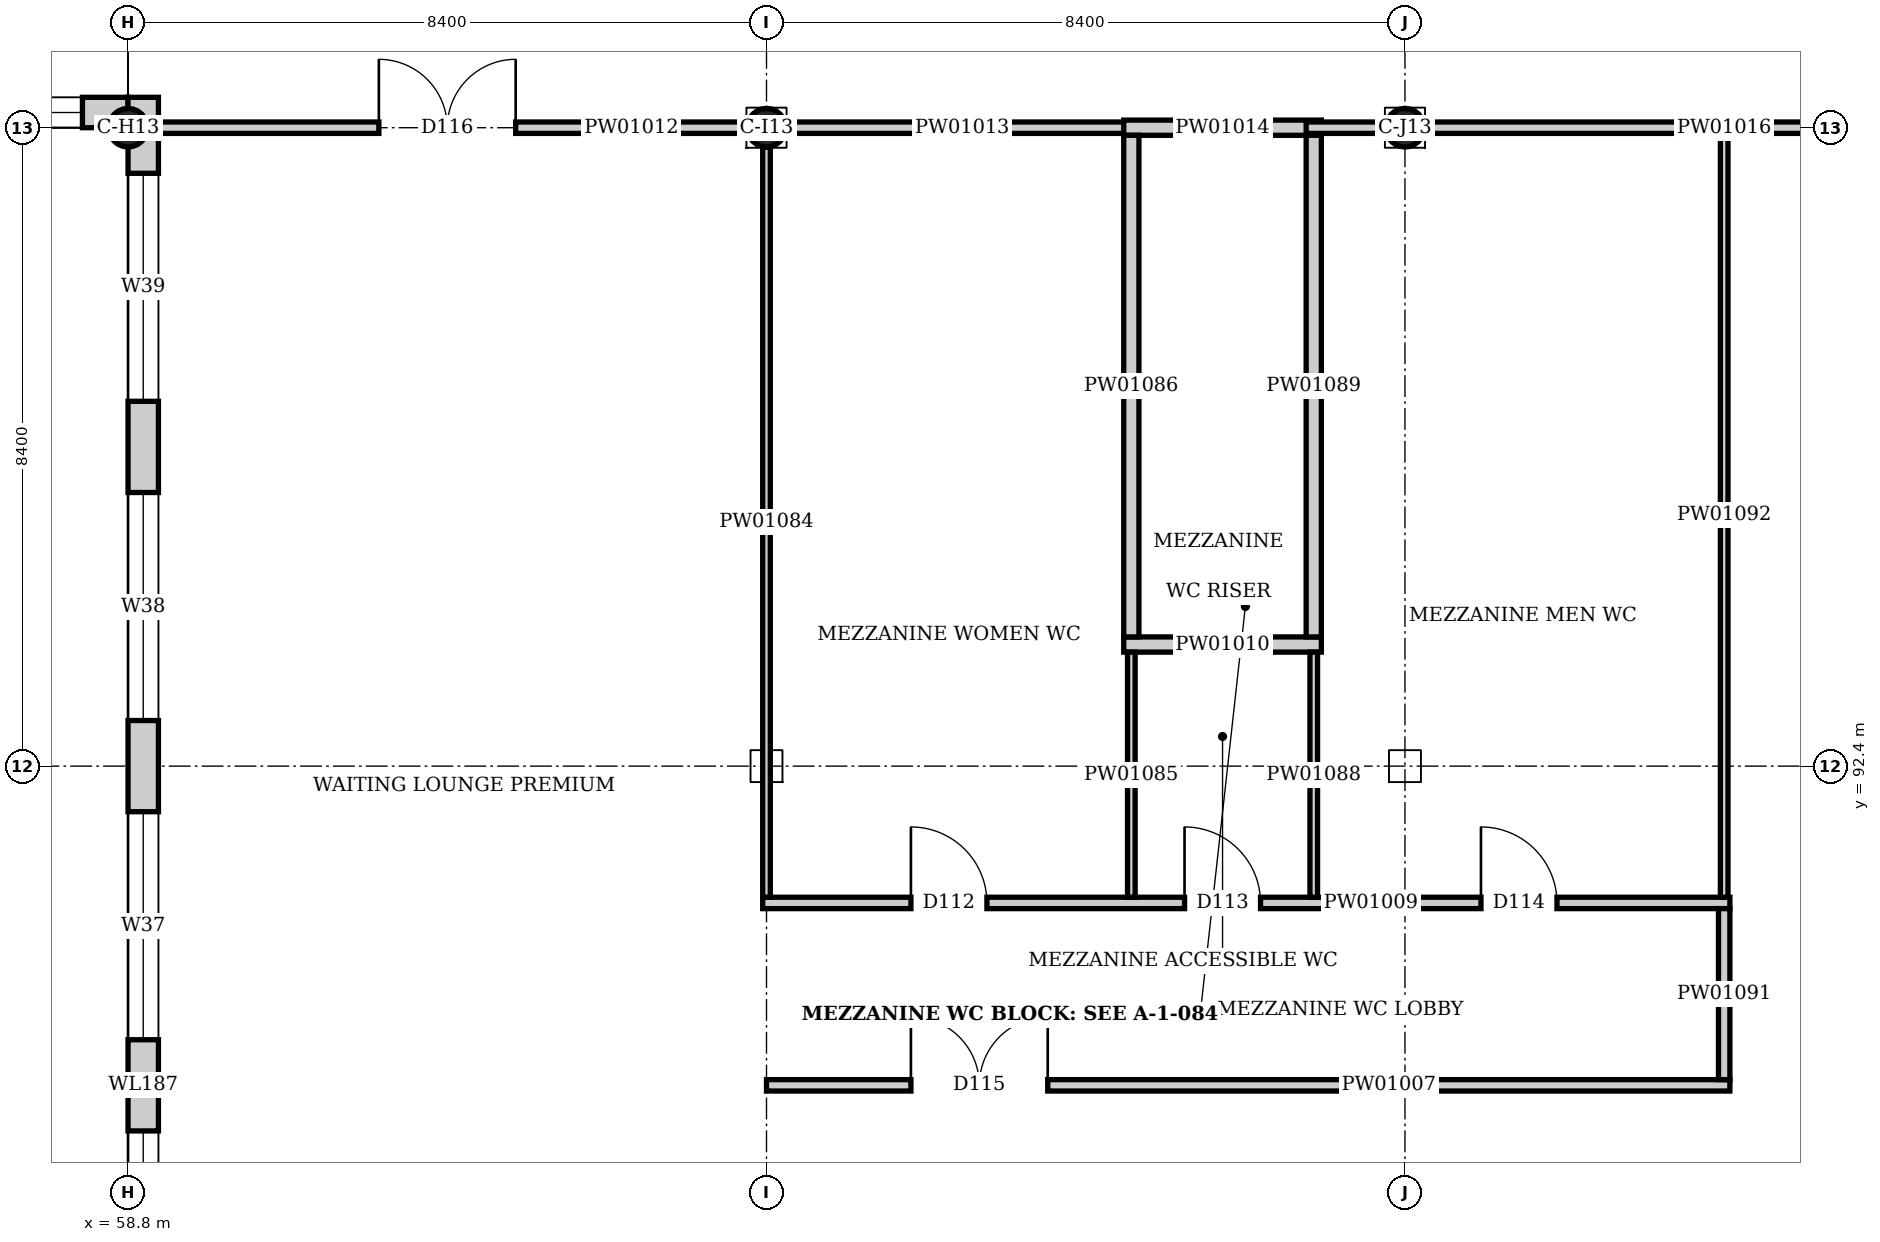
"""IFC4 building model, lengths in metres.
Left out: names, types, materials, properties, quantities, classifications, styles, units other than length and angle.
Written with IfcOpenShell. Run it as: python <this file> out.ifc"""

import sys

from ifc_helpers import new_model, si_unit, direction, frame, frame_2d, origin, origin_2d, place, context, subcontext, project, spatial, rectangle, hollow_circle, extrude, element, fill, save


model = new_model("IFC4")
c1 = context("Model", 3, precision=1e-05, world=origin(), true_north=direction((0.0, 1.0)))
c2 = subcontext(c1, "Body", "Model", "MODEL_VIEW")
j1 = project(units=[si_unit("LENGTHUNIT", "METRE"), si_unit("PLANEANGLEUNIT", "RADIAN")], contexts=[c1])
p1 = place(None, origin())
s1 = spatial("IfcSite", under=j1, at=p1, CompositionType="ELEMENT")
p2 = place(p1, origin())
s2 = spatial("IfcBuilding", under=s1, at=p2, CompositionType="ELEMENT")
p3 = place(p2, frame((0.0, 0.0, 6.0)))
s3 = spatial("IfcBuildingStorey", under=s2, at=p3, CompositionType="ELEMENT", Elevation=6.0)
for number, where, z_axis, x_axis in (
    (1, (58.8, 100.8, 0.0), (0.0, 0.0, 1.0), (1.0, 0.0, 0.0)),
    (2, (67.2, 100.8, 0.0), (0.0, 0.0, 1.0), (1.0, 0.0, 0.0)),
    (3, (75.6, 100.8, 0.0), (0.0, 0.0, 1.0), (1.0, 0.0, 0.0)),
):
    element("IfcColumn", number, at=place(p3, frame(where, z_axis=z_axis, x_axis=x_axis)), inside=s3, PredefinedType="COLUMN", context=c2, shape_type="SweptSolid", body=[
        extrude(hollow_circle(Radius=0.254, WallThickness=0.016, at=origin_2d()), origin(), (0.0, 0.0, 1.0), 4.8),
    ])
p4 = place(p3, frame((25.454, 101.0, 0.0), z_axis=(0.0, 0.0, 1.0), x_axis=(1.0, 0.0, 0.0)))
e4 = element("IfcWall", 4, at=p4, inside=s3, PredefinedType="SOLIDWALL", context=c2, shape_type="SweptSolid", body=[
    extrude(rectangle(XDim=33.346, YDim=0.4, at=frame_2d((16.673, 0.0))), origin(), (0.0, 0.0, 1.0), 4.6),
])
p5 = place(p4, frame((0.346, 0.0, 0.6)))
e5 = element("IfcOpeningElement", 5, at=p5, cuts=e4, PredefinedType="OPENING", context=c2, shape_type="SweptSolid", body=[
    extrude(rectangle(XDim=3.0, YDim=2.7, at=frame_2d((1.5, 1.35))), frame((0.0, 0.21, 0.0), z_axis=(0.0, -1.0, 0.0), x_axis=(1.0, 0.0, 0.0)), (0.0, 0.0, 1.0), 0.42),
])
p6 = place(p4, frame((4.546, 0.0, 0.6)))
e6 = element("IfcOpeningElement", 6, at=p6, cuts=e4, PredefinedType="OPENING", context=c2, shape_type="SweptSolid", body=[
    extrude(rectangle(XDim=3.0, YDim=2.7, at=frame_2d((1.5, 1.35))), frame((0.0, 0.21, 0.0), z_axis=(0.0, -1.0, 0.0), x_axis=(1.0, 0.0, 0.0)), (0.0, 0.0, 1.0), 0.42),
])
p7 = place(p4, frame((8.746, 0.0, 0.6)))
e7 = element("IfcOpeningElement", 7, at=p7, cuts=e4, PredefinedType="OPENING", context=c2, shape_type="SweptSolid", body=[
    extrude(rectangle(XDim=3.0, YDim=2.7, at=frame_2d((1.5, 1.35))), frame((0.0, 0.21, 0.0), z_axis=(0.0, -1.0, 0.0), x_axis=(1.0, 0.0, 0.0)), (0.0, 0.0, 1.0), 0.42),
])
p8 = place(p4, frame((12.946, 0.0, 0.6)))
e8 = element("IfcOpeningElement", 8, at=p8, cuts=e4, PredefinedType="OPENING", context=c2, shape_type="SweptSolid", body=[
    extrude(rectangle(XDim=3.0, YDim=2.7, at=frame_2d((1.5, 1.35))), frame((0.0, 0.21, 0.0), z_axis=(0.0, -1.0, 0.0), x_axis=(1.0, 0.0, 0.0)), (0.0, 0.0, 1.0), 0.42),
])
p9 = place(p4, frame((17.146, 0.0, 0.6)))
e9 = element("IfcOpeningElement", 9, at=p9, cuts=e4, PredefinedType="OPENING", context=c2, shape_type="SweptSolid", body=[
    extrude(rectangle(XDim=3.0, YDim=2.7, at=frame_2d((1.5, 1.35))), frame((0.0, 0.21, 0.0), z_axis=(0.0, -1.0, 0.0), x_axis=(1.0, 0.0, 0.0)), (0.0, 0.0, 1.0), 0.42),
])
p10 = place(p4, frame((21.346, 0.0, 0.6)))
e10 = element("IfcOpeningElement", 10, at=p10, cuts=e4, PredefinedType="OPENING", context=c2, shape_type="SweptSolid", body=[
    extrude(rectangle(XDim=3.0, YDim=2.7, at=frame_2d((1.5, 1.35))), frame((0.0, 0.21, 0.0), z_axis=(0.0, -1.0, 0.0), x_axis=(1.0, 0.0, 0.0)), (0.0, 0.0, 1.0), 0.42),
])
p11 = place(p4, frame((25.546, 0.0, 0.6)))
e11 = element("IfcOpeningElement", 11, at=p11, cuts=e4, PredefinedType="OPENING", context=c2, shape_type="SweptSolid", body=[
    extrude(rectangle(XDim=3.0, YDim=2.7, at=frame_2d((1.5, 1.35))), frame((0.0, 0.21, 0.0), z_axis=(0.0, -1.0, 0.0), x_axis=(1.0, 0.0, 0.0)), (0.0, 0.0, 1.0), 0.42),
])
p12 = place(p4, frame((29.746, 0.0, 0.6)))
e12 = element("IfcOpeningElement", 12, at=p12, cuts=e4, PredefinedType="OPENING", context=c2, shape_type="SweptSolid", body=[
    extrude(rectangle(XDim=3.0, YDim=2.7, at=frame_2d((1.5, 1.35))), frame((0.0, 0.21, 0.0), z_axis=(0.0, -1.0, 0.0), x_axis=(1.0, 0.0, 0.0)), (0.0, 0.0, 1.0), 0.42),
])
p13 = place(p3, frame((59.0, 67.2, 0.0), z_axis=(0.0, 0.0, 1.0), x_axis=(0.0, 1.0, 0.0)))
e13 = element("IfcWall", 13, at=p13, inside=s3, PredefinedType="SOLIDWALL", context=c2, shape_type="SweptSolid", body=[
    extrude(rectangle(XDim=34.0, YDim=0.4, at=frame_2d((17.0, 0.0))), origin(), (0.0, 0.0, 1.0), 4.6),
])
p14 = place(p13, frame((0.6, 0.0, 0.6)))
e14 = element("IfcOpeningElement", 14, at=p14, cuts=e13, PredefinedType="OPENING", context=c2, shape_type="SweptSolid", body=[
    extrude(rectangle(XDim=3.0, YDim=2.7, at=frame_2d((1.5, 1.35))), frame((0.0, 0.21, 0.0), z_axis=(0.0, -1.0, 0.0), x_axis=(1.0, 0.0, 0.0)), (0.0, 0.0, 1.0), 0.42),
])
p15 = place(p13, frame((4.8, 0.0, 0.6)))
e15 = element("IfcOpeningElement", 15, at=p15, cuts=e13, PredefinedType="OPENING", context=c2, shape_type="SweptSolid", body=[
    extrude(rectangle(XDim=3.0, YDim=2.7, at=frame_2d((1.5, 1.35))), frame((0.0, 0.21, 0.0), z_axis=(0.0, -1.0, 0.0), x_axis=(1.0, 0.0, 0.0)), (0.0, 0.0, 1.0), 0.42),
])
p16 = place(p13, frame((9.0, 0.0, 0.6)))
e16 = element("IfcOpeningElement", 16, at=p16, cuts=e13, PredefinedType="OPENING", context=c2, shape_type="SweptSolid", body=[
    extrude(rectangle(XDim=3.0, YDim=2.7, at=frame_2d((1.5, 1.35))), frame((0.0, 0.21, 0.0), z_axis=(0.0, -1.0, 0.0), x_axis=(1.0, 0.0, 0.0)), (0.0, 0.0, 1.0), 0.42),
])
p17 = place(p13, frame((13.2, 0.0, 0.6)))
e17 = element("IfcOpeningElement", 17, at=p17, cuts=e13, PredefinedType="OPENING", context=c2, shape_type="SweptSolid", body=[
    extrude(rectangle(XDim=3.0, YDim=2.7, at=frame_2d((1.5, 1.35))), frame((0.0, 0.21, 0.0), z_axis=(0.0, -1.0, 0.0), x_axis=(1.0, 0.0, 0.0)), (0.0, 0.0, 1.0), 0.42),
])
p18 = place(p13, frame((17.4, 0.0, 0.6)))
e18 = element("IfcOpeningElement", 18, at=p18, cuts=e13, PredefinedType="OPENING", context=c2, shape_type="SweptSolid", body=[
    extrude(rectangle(XDim=3.0, YDim=2.7, at=frame_2d((1.5, 1.35))), frame((0.0, 0.21, 0.0), z_axis=(0.0, -1.0, 0.0), x_axis=(1.0, 0.0, 0.0)), (0.0, 0.0, 1.0), 0.42),
])
p19 = place(p13, frame((21.6, 0.0, 0.6)))
e19 = element("IfcOpeningElement", 19, at=p19, cuts=e13, PredefinedType="OPENING", context=c2, shape_type="SweptSolid", body=[
    extrude(rectangle(XDim=3.0, YDim=2.7, at=frame_2d((1.5, 1.35))), frame((0.0, 0.21, 0.0), z_axis=(0.0, -1.0, 0.0), x_axis=(1.0, 0.0, 0.0)), (0.0, 0.0, 1.0), 0.42),
])
p20 = place(p13, frame((25.8, 0.0, 0.6)))
e20 = element("IfcOpeningElement", 20, at=p20, cuts=e13, PredefinedType="OPENING", context=c2, shape_type="SweptSolid", body=[
    extrude(rectangle(XDim=3.0, YDim=2.7, at=frame_2d((1.5, 1.35))), frame((0.0, 0.21, 0.0), z_axis=(0.0, -1.0, 0.0), x_axis=(1.0, 0.0, 0.0)), (0.0, 0.0, 1.0), 0.42),
])
p21 = place(p13, frame((30.0, 0.0, 0.6)))
e21 = element("IfcOpeningElement", 21, at=p21, cuts=e13, PredefinedType="OPENING", context=c2, shape_type="SweptSolid", body=[
    extrude(rectangle(XDim=3.0, YDim=2.7, at=frame_2d((1.5, 1.35))), frame((0.0, 0.21, 0.0), z_axis=(0.0, -1.0, 0.0), x_axis=(1.0, 0.0, 0.0)), (0.0, 0.0, 1.0), 0.42),
])
p22 = place(p3, frame((67.2, 88.2, 0.0), z_axis=(0.0, 0.0, 1.0), x_axis=(1.0, 0.0, 0.0)))
e22 = element("IfcWall", 22, at=p22, inside=s3, PredefinedType="PARTITIONING", context=c2, shape_type="SweptSolid", body=[
    extrude(rectangle(XDim=12.675, YDim=0.15, at=frame_2d((6.337, 0.0))), origin(), (0.0, 0.0, 1.0), 4.6),
])
p23 = place(p22, frame((1.9, 0.0, 0.0)))
e23 = element("IfcOpeningElement", 23, at=p23, cuts=e22, PredefinedType="OPENING", context=c2, shape_type="SweptSolid", body=[
    extrude(rectangle(XDim=1.8, YDim=2.4, at=frame_2d((0.9, 1.2))), frame((0.0, 0.085, 0.0), z_axis=(0.0, -1.0, 0.0), x_axis=(1.0, 0.0, 0.0)), (0.0, 0.0, 1.0), 0.17),
])
p24 = place(p3, frame((67.15, 90.6, 0.0), z_axis=(0.0, 0.0, 1.0), x_axis=(1.0, 0.0, 0.0)))
e24 = element("IfcWall", 24, at=p24, inside=s3, PredefinedType="PARTITIONING", context=c2, shape_type="SweptSolid", body=[
    extrude(rectangle(XDim=12.725, YDim=0.15, at=frame_2d((6.363, 0.0))), origin(), (0.0, 0.0, 1.0), 4.6),
])
p25 = place(p24, frame((1.95, 0.0, 0.0)))
e25 = element("IfcOpeningElement", 25, at=p25, cuts=e24, PredefinedType="OPENING", context=c2, shape_type="SweptSolid", body=[
    extrude(rectangle(XDim=1.0, YDim=2.1, at=frame_2d((0.5, 1.05))), frame((0.0, 0.085, 0.0), z_axis=(0.0, -1.0, 0.0), x_axis=(1.0, 0.0, 0.0)), (0.0, 0.0, 1.0), 0.17),
])
p26 = place(p24, frame((5.55, 0.0, 0.0)))
e26 = element("IfcOpeningElement", 26, at=p26, cuts=e24, PredefinedType="OPENING", context=c2, shape_type="SweptSolid", body=[
    extrude(rectangle(XDim=1.0, YDim=2.1, at=frame_2d((0.5, 1.05))), frame((0.0, 0.085, 0.0), z_axis=(0.0, -1.0, 0.0), x_axis=(1.0, 0.0, 0.0)), (0.0, 0.0, 1.0), 0.17),
])
p27 = place(p24, frame((9.45, 0.0, 0.0)))
e27 = element("IfcOpeningElement", 27, at=p27, cuts=e24, PredefinedType="OPENING", context=c2, shape_type="SweptSolid", body=[
    extrude(rectangle(XDim=1.0, YDim=2.1, at=frame_2d((0.5, 1.05))), frame((0.0, 0.085, 0.0), z_axis=(0.0, -1.0, 0.0), x_axis=(1.0, 0.0, 0.0)), (0.0, 0.0, 1.0), 0.17),
])
p28 = place(p3, frame((71.9, 94.0, 0.0), z_axis=(0.0, 0.0, 1.0), x_axis=(1.0, 0.0, 0.0)))
e28 = element("IfcWall", 28, at=p28, inside=s3, PredefinedType="PARTITIONING", context=c2, shape_type="SweptSolid", body=[
    extrude(rectangle(XDim=2.6, YDim=0.2, at=frame_2d((1.3, 0.0))), origin(), (0.0, 0.0, 1.0), 4.6),
])
p29 = place(p3, frame((59.2, 100.8, 0.0), z_axis=(0.0, 0.0, 1.0), x_axis=(1.0, 0.0, 0.0)))
e29 = element("IfcWall", 29, at=p29, inside=s3, PredefinedType="PARTITIONING", context=c2, shape_type="SweptSolid", body=[
    extrude(rectangle(XDim=7.746, YDim=0.15, at=frame_2d((3.873, 0.0))), origin(), (0.0, 0.0, 1.0), 4.146),
])
p30 = place(p29, frame((2.9, 0.0, 0.0)))
e30 = element("IfcOpeningElement", 30, at=p30, cuts=e29, PredefinedType="OPENING", context=c2, shape_type="SweptSolid", body=[
    extrude(rectangle(XDim=1.8, YDim=2.4, at=frame_2d((0.9, 1.2))), frame((0.0, 0.085, 0.0), z_axis=(0.0, -1.0, 0.0), x_axis=(1.0, 0.0, 0.0)), (0.0, 0.0, 1.0), 0.17),
])
p31 = place(p3, frame((67.454, 100.8, 0.0), z_axis=(0.0, 0.0, 1.0), x_axis=(1.0, 0.0, 0.0)))
e31 = element("IfcWall", 31, at=p31, inside=s3, PredefinedType="PARTITIONING", context=c2, shape_type="SweptSolid", body=[
    extrude(rectangle(XDim=4.646, YDim=0.15, at=frame_2d((2.323, 0.0))), origin(), (0.0, 0.0, 1.0), 4.146),
])
p32 = place(p3, frame((71.9, 100.8, 0.0), z_axis=(0.0, 0.0, 1.0), x_axis=(1.0, 0.0, 0.0)))
e32 = element("IfcWall", 32, at=p32, inside=s3, PredefinedType="PARTITIONING", context=c2, shape_type="SweptSolid", body=[
    extrude(rectangle(XDim=2.6, YDim=0.2, at=frame_2d((1.3, 0.0))), origin(), (0.0, 0.0, 1.0), 4.146),
])
p33 = place(p3, frame((74.3, 100.8, 0.0), z_axis=(0.0, 0.0, 1.0), x_axis=(1.0, 0.0, 0.0)))
e33 = element("IfcWall", 33, at=p33, inside=s3, PredefinedType="PARTITIONING", context=c2, shape_type="SweptSolid", body=[
    extrude(rectangle(XDim=1.046, YDim=0.15, at=frame_2d((0.523, 0.0))), origin(), (0.0, 0.0, 1.0), 4.146),
])
p34 = place(p3, frame((75.854, 100.8, 0.0), z_axis=(0.0, 0.0, 1.0), x_axis=(1.0, 0.0, 0.0)))
e34 = element("IfcWall", 34, at=p34, inside=s3, PredefinedType="PARTITIONING", context=c2, shape_type="SweptSolid", body=[
    extrude(rectangle(XDim=7.892, YDim=0.15, at=frame_2d((3.946, 0.0))), origin(), (0.0, 0.0, 1.0), 4.146),
])
p35 = place(p3, frame((67.2, 90.675, 0.0), z_axis=(0.0, 0.0, 1.0), x_axis=(0.0, 1.0, 0.0)))
e35 = element("IfcWall", 35, at=p35, inside=s3, PredefinedType="PARTITIONING", context=c2, shape_type="SweptSolid", body=[
    extrude(rectangle(XDim=9.871, YDim=0.1, at=frame_2d((4.936, 0.0))), origin(), (0.0, 0.0, 1.0), 4.338),
])
p36 = place(p3, frame((72.0, 90.675, 0.0), z_axis=(0.0, 0.0, 1.0), x_axis=(0.0, 1.0, 0.0)))
e36 = element("IfcWall", 36, at=p36, inside=s3, PredefinedType="PARTITIONING", context=c2, shape_type="SweptSolid", body=[
    extrude(rectangle(XDim=3.225, YDim=0.1, at=frame_2d((1.612, 0.0))), origin(), (0.0, 0.0, 1.0), 4.6),
])
p37 = place(p3, frame((72.0, 94.1, 0.0), z_axis=(0.0, 0.0, 1.0), x_axis=(0.0, 1.0, 0.0)))
e37 = element("IfcWall", 37, at=p37, inside=s3, PredefinedType="PARTITIONING", context=c2, shape_type="SweptSolid", body=[
    extrude(rectangle(XDim=6.6, YDim=0.2, at=frame_2d((3.3, 0.0))), origin(), (0.0, 0.0, 1.0), 4.6),
])
p38 = place(p3, frame((74.4, 90.675, 0.0), z_axis=(0.0, 0.0, 1.0), x_axis=(0.0, 1.0, 0.0)))
e38 = element("IfcWall", 38, at=p38, inside=s3, PredefinedType="PARTITIONING", context=c2, shape_type="SweptSolid", body=[
    extrude(rectangle(XDim=3.225, YDim=0.1, at=frame_2d((1.612, 0.0))), origin(), (0.0, 0.0, 1.0), 4.6),
])
p39 = place(p3, frame((74.4, 94.1, 0.0), z_axis=(0.0, 0.0, 1.0), x_axis=(0.0, 1.0, 0.0)))
e39 = element("IfcWall", 39, at=p39, inside=s3, PredefinedType="PARTITIONING", context=c2, shape_type="SweptSolid", body=[
    extrude(rectangle(XDim=6.6, YDim=0.2, at=frame_2d((3.3, 0.0))), origin(), (0.0, 0.0, 1.0), 4.6),
])
p40 = place(p3, frame((79.8, 88.275, 0.0), z_axis=(0.0, 0.0, 1.0), x_axis=(0.0, 1.0, 0.0)))
e40 = element("IfcWall", 40, at=p40, inside=s3, PredefinedType="PARTITIONING", context=c2, shape_type="SweptSolid", body=[
    extrude(rectangle(XDim=2.25, YDim=0.15, at=frame_2d((1.125, 0.0))), origin(), (0.0, 0.0, 1.0), 4.6),
])
p41 = place(p3, frame((79.8, 90.675, 0.0), z_axis=(0.0, 0.0, 1.0), x_axis=(0.0, 1.0, 0.0)))
e41 = element("IfcWall", 41, at=p41, inside=s3, PredefinedType="PARTITIONING", context=c2, shape_type="SweptSolid", body=[
    extrude(rectangle(XDim=10.05, YDim=0.1, at=frame_2d((5.025, 0.0))), origin(), (0.0, 0.0, 1.0), 4.6),
])
p42 = place(p12, origin())
e42 = element("IfcWindow", 42, at=p42, inside=s3, PartitioningType="SINGLE_PANEL", PredefinedType="WINDOW", context=c2, shape_type="SweptSolid", body=[
    extrude(rectangle(XDim=3.0, YDim=2.7, at=frame_2d((1.5, 1.35))), frame((0.0, 0.03, 0.0), z_axis=(0.0, -1.0, 0.0), x_axis=(1.0, 0.0, 0.0)), (0.0, 0.0, 1.0), 0.06),
])
fill(e12, e42)
p43 = place(p18, origin())
e43 = element("IfcWindow", 43, at=p43, inside=s3, PartitioningType="SINGLE_PANEL", PredefinedType="WINDOW", context=c2, shape_type="SweptSolid", body=[
    extrude(rectangle(XDim=3.0, YDim=2.7, at=frame_2d((1.5, 1.35))), frame((0.0, 0.03, 0.0), z_axis=(0.0, -1.0, 0.0), x_axis=(1.0, 0.0, 0.0)), (0.0, 0.0, 1.0), 0.06),
])
fill(e18, e43)
p44 = place(p19, origin())
e44 = element("IfcWindow", 44, at=p44, inside=s3, PartitioningType="SINGLE_PANEL", PredefinedType="WINDOW", context=c2, shape_type="SweptSolid", body=[
    extrude(rectangle(XDim=3.0, YDim=2.7, at=frame_2d((1.5, 1.35))), frame((0.0, 0.03, 0.0), z_axis=(0.0, -1.0, 0.0), x_axis=(1.0, 0.0, 0.0)), (0.0, 0.0, 1.0), 0.06),
])
fill(e19, e44)
p45 = place(p20, origin())
e45 = element("IfcWindow", 45, at=p45, inside=s3, PartitioningType="SINGLE_PANEL", PredefinedType="WINDOW", context=c2, shape_type="SweptSolid", body=[
    extrude(rectangle(XDim=3.0, YDim=2.7, at=frame_2d((1.5, 1.35))), frame((0.0, 0.03, 0.0), z_axis=(0.0, -1.0, 0.0), x_axis=(1.0, 0.0, 0.0)), (0.0, 0.0, 1.0), 0.06),
])
fill(e20, e45)
p46 = place(p21, origin())
e46 = element("IfcWindow", 46, at=p46, inside=s3, PartitioningType="SINGLE_PANEL", PredefinedType="WINDOW", context=c2, shape_type="SweptSolid", body=[
    extrude(rectangle(XDim=3.0, YDim=2.7, at=frame_2d((1.5, 1.35))), frame((0.0, 0.03, 0.0), z_axis=(0.0, -1.0, 0.0), x_axis=(1.0, 0.0, 0.0)), (0.0, 0.0, 1.0), 0.06),
])
fill(e21, e46)
p47 = place(p25, origin())
e47 = element("IfcDoor", 47, at=p47, inside=s3, OperationType="SINGLE_SWING_LEFT", PredefinedType="DOOR", context=c2, shape_type="SweptSolid", body=[
    extrude(rectangle(XDim=1.0, YDim=2.1, at=frame_2d((0.5, 1.05))), frame((0.0, 0.025, 0.0), z_axis=(0.0, -1.0, 0.0), x_axis=(1.0, 0.0, 0.0)), (0.0, 0.0, 1.0), 0.05),
])
fill(e25, e47)
p48 = place(p26, origin())
e48 = element("IfcDoor", 48, at=p48, inside=s3, OperationType="SINGLE_SWING_LEFT", PredefinedType="DOOR", context=c2, shape_type="SweptSolid", body=[
    extrude(rectangle(XDim=1.0, YDim=2.1, at=frame_2d((0.5, 1.05))), frame((0.0, 0.025, 0.0), z_axis=(0.0, -1.0, 0.0), x_axis=(1.0, 0.0, 0.0)), (0.0, 0.0, 1.0), 0.05),
])
fill(e26, e48)
p49 = place(p27, origin())
e49 = element("IfcDoor", 49, at=p49, inside=s3, OperationType="SINGLE_SWING_LEFT", PredefinedType="DOOR", context=c2, shape_type="SweptSolid", body=[
    extrude(rectangle(XDim=1.0, YDim=2.1, at=frame_2d((0.5, 1.05))), frame((0.0, 0.025, 0.0), z_axis=(0.0, -1.0, 0.0), x_axis=(1.0, 0.0, 0.0)), (0.0, 0.0, 1.0), 0.05),
])
fill(e27, e49)
p50 = place(p23, origin())
e50 = element("IfcDoor", 50, at=p50, inside=s3, OperationType="DOUBLE_DOOR_SINGLE_SWING", PredefinedType="DOOR", context=c2, shape_type="SweptSolid", body=[
    extrude(rectangle(XDim=1.8, YDim=2.4, at=frame_2d((0.9, 1.2))), frame((0.0, 0.025, 0.0), z_axis=(0.0, -1.0, 0.0), x_axis=(1.0, 0.0, 0.0)), (0.0, 0.0, 1.0), 0.05),
])
fill(e23, e50)
p51 = place(p30, origin())
e51 = element("IfcDoor", 51, at=p51, inside=s3, OperationType="DOUBLE_DOOR_SINGLE_SWING", PredefinedType="DOOR", context=c2, shape_type="SweptSolid", body=[
    extrude(rectangle(XDim=1.8, YDim=2.4, at=frame_2d((0.9, 1.2))), frame((0.0, 0.025, 0.0), z_axis=(0.0, -1.0, 0.0), x_axis=(1.0, 0.0, 0.0)), (0.0, 0.0, 1.0), 0.05),
])
fill(e30, e51)
save(model, sys.argv[1])
